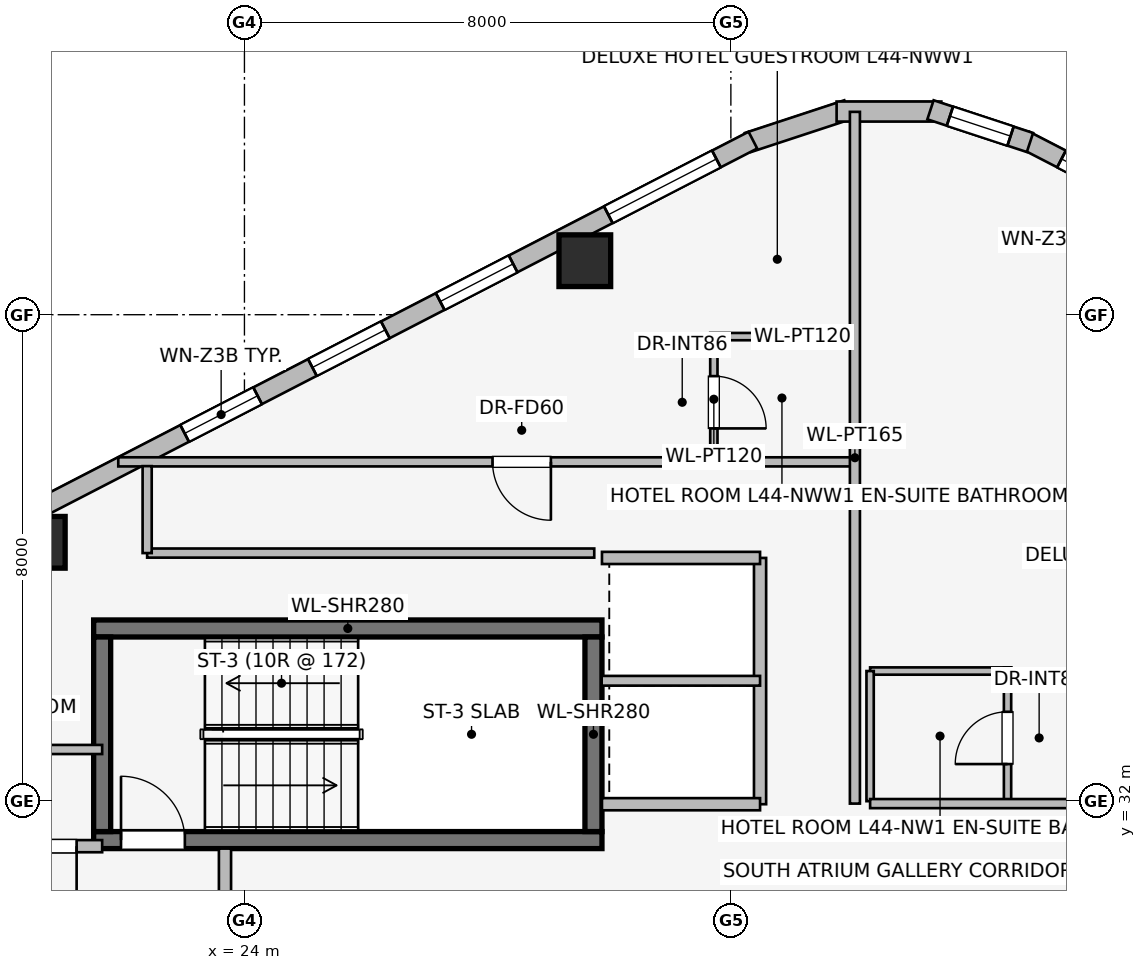
"""IFC4 building model, lengths in metres.
Left out: names, types, materials, properties, quantities, classifications, styles, units other than length and angle.
Written with IfcOpenShell. Run it as: python <this file> out.ifc"""

import sys

from ifc_helpers import new_model, si_unit, direction, frame, frame_2d, origin, origin_2d, place, context, subcontext, project, spatial, rectangle, extrude, element, fill, save


model = new_model("IFC4")
c1 = context("Model", 3, precision=1e-05, world=origin(), true_north=direction((0.0, 1.0)))
c2 = subcontext(c1, "Body", "Model", "MODEL_VIEW")
j1 = project(units=[si_unit("LENGTHUNIT", "METRE"), si_unit("PLANEANGLEUNIT", "RADIAN")], contexts=[c1])
p1 = place(None, origin())
s1 = spatial("IfcSite", under=j1, at=p1, CompositionType="ELEMENT")
p2 = place(p1, origin())
s2 = spatial("IfcBuilding", under=s1, at=p2, CompositionType="ELEMENT")
p3 = place(p2, frame((0.0, 0.0, 163.65)))
s3 = spatial("IfcBuildingStorey", under=s2, at=p3, CompositionType="ELEMENT", Elevation=163.65)
p4 = place(p3, frame((21.52, 31.36, 0.0), z_axis=(0.0, 0.0, 1.0), x_axis=(1.0, 0.0, 0.0)))
e1 = element("IfcWall", 1, at=p4, inside=s3, PredefinedType="SHEAR", context=c2, shape_type="SweptSolid", body=[
    extrude(rectangle(XDim=8.36, YDim=0.28, at=frame_2d((4.18, 0.0))), origin(), (0.0, 0.0, 1.0), 3.45),
])
p5 = place(p4, frame((0.45, 0.0, 0.0)))
e2 = element("IfcOpeningElement", 2, at=p5, cuts=e1, PredefinedType="OPENING", context=c2, shape_type="SweptSolid", body=[
    extrude(rectangle(XDim=1.05, YDim=2.0, at=frame_2d((0.525, 1.0))), frame((0.0, 0.15, 0.0), z_axis=(0.0, -1.0, 0.0), x_axis=(1.0, 0.0, 0.0)), (0.0, 0.0, 1.0), 0.3),
])
p6 = place(p3, frame((29.88, 34.84, 0.0), z_axis=(0.0, 0.0, 1.0), x_axis=(-1.0, 0.0, 0.0)))
e3 = element("IfcWall", 3, at=p6, inside=s3, PredefinedType="SHEAR", context=c2, shape_type="SweptSolid", body=[
    extrude(rectangle(XDim=8.36, YDim=0.28, at=frame_2d((4.18, 0.0))), origin(), (0.0, 0.0, 1.0), 3.45),
])
for number, where, z_axis, x_axis in (
    (4, (21.66, 34.7, 0.0), (0.0, 0.0, 1.0), (0.0, -1.0, 0.0)),
    (5, (29.74, 31.5, 0.0), (0.0, 0.0, 1.0), (0.0, 1.0, 0.0)),
):
    element("IfcWall", number, at=place(p3, frame(where, z_axis=z_axis, x_axis=x_axis)), inside=s3, PredefinedType="SHEAR", context=c2, shape_type="SweptSolid", body=[
        extrude(rectangle(XDim=3.2, YDim=0.28, at=frame_2d((1.6, 0.0))), origin(), (0.0, 0.0, 1.0), 3.45),
    ])
for number, where, z_axis, x_axis in (
    (6, (29.598, 40.888, 0.0), (0.0, 0.0, 1.0), (1.0, 0.0, 0.0)),
    (7, (20.626, 36.257, 0.0), (0.0, 0.0, 1.0), (1.0, 0.0, 0.0)),
):
    element("IfcColumn", number, at=place(p3, frame(where, z_axis=z_axis, x_axis=x_axis)), inside=s3, PredefinedType="COLUMN", context=c2, shape_type="SweptSolid", body=[
        extrude(rectangle(XDim=0.85, YDim=0.85, at=origin_2d()), origin(), (0.0, 0.0, 1.0), 3.45),
    ])
p7 = place(p3, frame((36.838, 42.871, 0.0), z_axis=(0.0, 0.0, 1.0), x_axis=(0.888645948291, -0.458593914686, 0.0)))
e8 = element("IfcWall", 8, at=p7, inside=s3, PredefinedType="STANDARD", context=c2, shape_type="SweptSolid", body=[
    extrude(rectangle(XDim=7.741, YDim=0.31, at=frame_2d((3.871, 0.0))), origin(), (0.0, 0.0, 1.0), 3.19),
])
p8 = place(p7, frame((4.196, 0.0, 0.0)))
e9 = element("IfcOpeningElement", 9, at=p8, cuts=e8, PredefinedType="OPENING", context=c2, shape_type="SweptSolid", body=[
    extrude(rectangle(XDim=1.1, YDim=2.04, at=frame_2d((0.55, 1.02))), frame((0.0, 0.165, 0.0), z_axis=(0.0, -1.0, 0.0), x_axis=(1.0, 0.0, 0.0)), (0.0, 0.0, 1.0), 0.33),
])
p9 = place(p7, frame((0.675, 0.0, 0.75)))
e10 = element("IfcOpeningElement", 10, at=p9, cuts=e8, PredefinedType="OPENING", context=c2, shape_type="SweptSolid", body=[
    extrude(rectangle(XDim=2.0, YDim=1.5, at=frame_2d((1.0, 0.75))), frame((0.0, 0.165, 0.0), z_axis=(0.0, -1.0, 0.0), x_axis=(1.0, 0.0, 0.0)), (0.0, 0.0, 1.0), 0.33),
])
p10 = place(p7, frame((5.879, 0.0, 0.75)))
e11 = element("IfcOpeningElement", 11, at=p10, cuts=e8, PredefinedType="OPENING", context=c2, shape_type="SweptSolid", body=[
    extrude(rectangle(XDim=1.05, YDim=1.4, at=frame_2d((0.525, 0.7))), frame((0.0, 0.165, 0.0), z_axis=(0.0, -1.0, 0.0), x_axis=(1.0, 0.0, 0.0)), (0.0, 0.0, 1.0), 0.33),
])
p11 = place(p3, frame((32.281, 42.832, 0.0), z_axis=(0.0, 0.0, 1.0), x_axis=(0.949937416267, 0.312440242569, 0.0)))
e12 = element("IfcWall", 12, at=p11, inside=s3, PredefinedType="STANDARD", context=c2, shape_type="SweptSolid", body=[
    extrude(rectangle(XDim=1.722, YDim=0.33, at=frame_2d((0.861, 0.0))), origin(), (0.0, 0.0, 1.0), 3.19),
])
p12 = place(p3, frame((33.739, 43.341, 0.0), z_axis=(0.0, 0.0, 1.0), x_axis=(1.0, 0.0, 0.0)))
e13 = element("IfcWall", 13, at=p12, inside=s3, PredefinedType="STANDARD", context=c2, shape_type="SweptSolid", body=[
    extrude(rectangle(XDim=1.722, YDim=0.33, at=frame_2d((0.861, 0.0))), origin(), (0.0, 0.0, 1.0), 3.19),
])
p13 = place(p3, frame((35.283, 43.37, 0.0), z_axis=(0.0, 0.0, 1.0), x_axis=(0.949937416267, -0.312440242569, 0.0)))
e14 = element("IfcWall", 14, at=p13, inside=s3, PredefinedType="STANDARD", context=c2, shape_type="SweptSolid", body=[
    extrude(rectangle(XDim=1.722, YDim=0.33, at=frame_2d((0.861, 0.0))), origin(), (0.0, 0.0, 1.0), 3.19),
])
p14 = place(p13, frame((0.336, 0.0, 0.75)))
e15 = element("IfcOpeningElement", 15, at=p14, cuts=e14, PredefinedType="OPENING", context=c2, shape_type="SweptSolid", body=[
    extrude(rectangle(XDim=1.05, YDim=1.4, at=frame_2d((0.525, 0.7))), frame((0.0, 0.175, 0.0), z_axis=(0.0, -1.0, 0.0), x_axis=(1.0, 0.0, 0.0)), (0.0, 0.0, 1.0), 0.35),
])
p15 = place(p3, frame((17.408, 35.153, 0.0), z_axis=(0.0, 0.0, 1.0), x_axis=(0.888626188278, 0.458632202867, 0.0)))
e16 = element("IfcWall", 16, at=p15, inside=s3, PredefinedType="STANDARD", context=c2, shape_type="SweptSolid", body=[
    extrude(rectangle(XDim=16.828, YDim=0.31, at=frame_2d((8.414, 0.0))), origin(), (0.0, 0.0, 1.0), 3.19),
])
p16 = place(p15, frame((0.675, 0.0, 0.75)))
e17 = element("IfcOpeningElement", 17, at=p16, cuts=e16, PredefinedType="OPENING", context=c2, shape_type="SweptSolid", body=[
    extrude(rectangle(XDim=2.0, YDim=1.5, at=frame_2d((1.0, 0.75))), frame((0.0, 0.165, 0.0), z_axis=(0.0, -1.0, 0.0), x_axis=(1.0, 0.0, 0.0)), (0.0, 0.0, 1.0), 0.33),
])
p17 = place(p15, frame((6.312, 0.0, 0.75)))
e18 = element("IfcOpeningElement", 18, at=p17, cuts=e16, PredefinedType="OPENING", context=c2, shape_type="SweptSolid", body=[
    extrude(rectangle(XDim=1.35, YDim=1.45, at=frame_2d((0.675, 0.725))), frame((0.0, 0.165, 0.0), z_axis=(0.0, -1.0, 0.0), x_axis=(1.0, 0.0, 0.0)), (0.0, 0.0, 1.0), 0.33),
])
p18 = place(p15, frame((8.676, 0.0, 0.75)))
e19 = element("IfcOpeningElement", 19, at=p18, cuts=e16, PredefinedType="OPENING", context=c2, shape_type="SweptSolid", body=[
    extrude(rectangle(XDim=1.35, YDim=1.45, at=frame_2d((0.675, 0.725))), frame((0.0, 0.165, 0.0), z_axis=(0.0, -1.0, 0.0), x_axis=(1.0, 0.0, 0.0)), (0.0, 0.0, 1.0), 0.33),
])
p19 = place(p15, frame((11.041, 0.0, 0.75)))
e20 = element("IfcOpeningElement", 20, at=p19, cuts=e16, PredefinedType="OPENING", context=c2, shape_type="SweptSolid", body=[
    extrude(rectangle(XDim=1.35, YDim=1.45, at=frame_2d((0.675, 0.725))), frame((0.0, 0.165, 0.0), z_axis=(0.0, -1.0, 0.0), x_axis=(1.0, 0.0, 0.0)), (0.0, 0.0, 1.0), 0.33),
])
p20 = place(p15, frame((14.153, 0.0, 0.75)))
e21 = element("IfcOpeningElement", 21, at=p20, cuts=e16, PredefinedType="OPENING", context=c2, shape_type="SweptSolid", body=[
    extrude(rectangle(XDim=2.0, YDim=1.5, at=frame_2d((1.0, 0.75))), frame((0.0, 0.165, 0.0), z_axis=(0.0, -1.0, 0.0), x_axis=(1.0, 0.0, 0.0)), (0.0, 0.0, 1.0), 0.33),
])
p21 = place(p3, frame((23.68, 25.68, 0.0), z_axis=(0.0, 0.0, 1.0), x_axis=(0.0, 1.0, 0.0)))
e22 = element("IfcWall", 22, at=p21, inside=s3, PredefinedType="PARTITIONING", context=c2, shape_type="SweptSolid", body=[
    extrude(rectangle(XDim=5.54, YDim=0.2, at=frame_2d((2.77, 0.0))), origin(), (0.0, 0.0, 1.0), 3.19),
])
p22 = place(p21, frame((1.8, 0.0, 0.0)))
e23 = element("IfcOpeningElement", 23, at=p22, cuts=e22, PredefinedType="OPENING", context=c2, shape_type="SweptSolid", body=[
    extrude(rectangle(XDim=1.05, YDim=2.0, at=frame_2d((0.525, 1.0))), frame((0.0, 0.11, 0.0), z_axis=(0.0, -1.0, 0.0), x_axis=(1.0, 0.0, 0.0)), (0.0, 0.0, 1.0), 0.22),
])
p23 = place(p3, frame((21.66, 31.26, 0.0), z_axis=(0.0, 0.0, 1.0), x_axis=(-1.0, 0.0, 0.0)))
e24 = element("IfcWall", 24, at=p23, inside=s3, PredefinedType="PARTITIONING", context=c2, shape_type="SweptSolid", body=[
    extrude(rectangle(XDim=2.01, YDim=0.2, at=frame_2d((1.005, 0.0))), origin(), (0.0, 0.0, 1.0), 3.19),
])
p24 = place(p23, frame((0.42, 0.0, 0.0)))
e25 = element("IfcOpeningElement", 25, at=p24, cuts=e24, PredefinedType="OPENING", context=c2, shape_type="SweptSolid", body=[
    extrude(rectangle(XDim=0.86, YDim=2.0, at=frame_2d((0.43, 1.0))), frame((0.0, 0.11, 0.0), z_axis=(0.0, -1.0, 0.0), x_axis=(1.0, 0.0, 0.0)), (0.0, 0.0, 1.0), 0.22),
])
p25 = place(p3, frame((32.48, 31.95, 0.0), z_axis=(0.0, 0.0, 1.0), x_axis=(0.0, 1.0, 0.0)))
e26 = element("IfcWall", 26, at=p25, inside=s3, PredefinedType="PARTITIONING", context=c2, shape_type="SweptSolid", body=[
    extrude(rectangle(XDim=4.05, YDim=0.2, at=frame_2d((2.025, 0.0))), origin(), (0.0, 0.0, 1.0), 3.19),
])
for number, where, z_axis, x_axis in (
    (27, (29.88, 36.0, 0.0), (0.0, 0.0, 1.0), (1.0, 0.0, 0.0)),
    (28, (32.48, 31.95, 0.0), (0.0, 0.0, 1.0), (-1.0, 0.0, 0.0)),
):
    element("IfcWall", number, at=place(p3, frame(where, z_axis=z_axis, x_axis=x_axis)), inside=s3, PredefinedType="PARTITIONING", context=c2, shape_type="SweptSolid", body=[
        extrude(rectangle(XDim=2.6, YDim=0.2, at=frame_2d((1.3, 0.0))), origin(), (0.0, 0.0, 1.0), 3.19),
    ])
p26 = place(p3, frame((29.875, 33.98, 0.0), z_axis=(0.0, 0.0, 1.0), x_axis=(1.0, 0.0, 0.0)))
e29 = element("IfcWall", 29, at=p26, inside=s3, PredefinedType="PARTITIONING", context=c2, shape_type="SweptSolid", body=[
    extrude(rectangle(XDim=2.605, YDim=0.16, at=frame_2d((1.302, 0.0))), origin(), (0.0, 0.0, 1.0), 3.19),
])
p27 = place(p3, frame((21.66, 32.85, 0.0), z_axis=(0.0, 0.0, 1.0), x_axis=(-1.0, 0.0, 0.0)))
e30 = element("IfcWall", 30, at=p27, inside=s3, PredefinedType="PARTITIONING", context=c2, shape_type="SweptSolid", body=[
    extrude(rectangle(XDim=1.71, YDim=0.15, at=frame_2d((0.855, 0.0))), origin(), (0.0, 0.0, 1.0), 3.19),
])
p28 = place(p3, frame((34.0, 39.64, 0.0), z_axis=(0.0, 0.0, 1.0), x_axis=(-1.0, 0.0, 0.0)))
e31 = element("IfcWall", 31, at=p28, inside=s3, PredefinedType="PARTITIONING", context=c2, shape_type="SweptSolid", body=[
    extrude(rectangle(XDim=2.34, YDim=0.12, at=frame_2d((1.17, 0.0))), origin(), (0.0, 0.0, 1.0), 3.19),
])
p29 = place(p3, frame((31.72, 39.64, 0.0), z_axis=(0.0, 0.0, 1.0), x_axis=(0.0, -1.0, 0.0)))
e32 = element("IfcWall", 32, at=p29, inside=s3, PredefinedType="PARTITIONING", context=c2, shape_type="SweptSolid", body=[
    extrude(rectangle(XDim=2.06, YDim=0.12, at=frame_2d((1.03, 0.0))), origin(), (0.0, 0.0, 1.0), 3.19),
])
p30 = place(p29, frame((0.65, 0.0, 0.0)))
e33 = element("IfcOpeningElement", 33, at=p30, cuts=e32, PredefinedType="OPENING", context=c2, shape_type="SweptSolid", body=[
    extrude(rectangle(XDim=0.86, YDim=2.0, at=frame_2d((0.43, 1.0))), frame((0.0, 0.07, 0.0), z_axis=(0.0, -1.0, 0.0), x_axis=(1.0, 0.0, 0.0)), (0.0, 0.0, 1.0), 0.14),
])
p31 = place(p3, frame((34.0, 37.58, 0.0), z_axis=(0.0, 0.0, 1.0), x_axis=(-1.0, 0.0, 0.0)))
e34 = element("IfcWall", 34, at=p31, inside=s3, PredefinedType="PARTITIONING", context=c2, shape_type="SweptSolid", body=[
    extrude(rectangle(XDim=12.075, YDim=0.15, at=frame_2d((6.038, 0.0))), origin(), (0.0, 0.0, 1.0), 3.19),
])
p32 = place(p31, frame((4.96, 0.0, 0.0)))
e35 = element("IfcOpeningElement", 35, at=p32, cuts=e34, PredefinedType="OPENING", context=c2, shape_type="SweptSolid", body=[
    extrude(rectangle(XDim=0.96, YDim=2.0, at=frame_2d((0.48, 1.0))), frame((0.0, 0.085, 0.0), z_axis=(0.0, -1.0, 0.0), x_axis=(1.0, 0.0, 0.0)), (0.0, 0.0, 1.0), 0.17),
])
p33 = place(p3, frame((34.04, 31.96, 0.0), z_axis=(0.0, 0.0, 1.0), x_axis=(0.0, 1.0, 0.0)))
e36 = element("IfcWall", 36, at=p33, inside=s3, PredefinedType="PARTITIONING", context=c2, shape_type="SweptSolid", body=[
    extrude(rectangle(XDim=11.376, YDim=0.165, at=frame_2d((5.688, 0.0))), origin(), (0.0, 0.0, 1.0), 3.19),
])
p34 = place(p3, frame((36.55, 31.96, 0.0), z_axis=(0.0, 0.0, 1.0), x_axis=(0.0, 1.0, 0.0)))
e37 = element("IfcWall", 37, at=p34, inside=s3, PredefinedType="PARTITIONING", context=c2, shape_type="SweptSolid", body=[
    extrude(rectangle(XDim=2.24, YDim=0.12, at=frame_2d((1.12, 0.0))), origin(), (0.0, 0.0, 1.0), 3.19),
])
p35 = place(p34, frame((0.65, 0.0, 0.0)))
e38 = element("IfcOpeningElement", 38, at=p35, cuts=e37, PredefinedType="OPENING", context=c2, shape_type="SweptSolid", body=[
    extrude(rectangle(XDim=0.86, YDim=2.0, at=frame_2d((0.43, 1.0))), frame((0.0, 0.07, 0.0), z_axis=(0.0, -1.0, 0.0), x_axis=(1.0, 0.0, 0.0)), (0.0, 0.0, 1.0), 0.14),
])
p36 = place(p3, frame((36.61, 34.14, 0.0), z_axis=(0.0, 0.0, 1.0), x_axis=(-1.0, 0.0, 0.0)))
e39 = element("IfcWall", 39, at=p36, inside=s3, PredefinedType="PARTITIONING", context=c2, shape_type="SweptSolid", body=[
    extrude(rectangle(XDim=2.32, YDim=0.12, at=frame_2d((1.16, 0.0))), origin(), (0.0, 0.0, 1.0), 3.19),
])
p37 = place(p3, frame((34.29, 34.14, 0.0), z_axis=(0.0, 0.0, 1.0), x_axis=(0.0, -1.0, 0.0)))
e40 = element("IfcWall", 40, at=p37, inside=s3, PredefinedType="PARTITIONING", context=c2, shape_type="SweptSolid", body=[
    extrude(rectangle(XDim=2.14, YDim=0.12, at=frame_2d((1.07, 0.0))), origin(), (0.0, 0.0, 1.0), 3.19),
])
p38 = place(p3, frame((43.985, 31.96, 0.0), z_axis=(0.0, 0.0, 1.0), x_axis=(-1.0, 0.0, 0.0)))
e41 = element("IfcWall", 41, at=p38, inside=s3, PredefinedType="PARTITIONING", context=c2, shape_type="SweptSolid", body=[
    extrude(rectangle(XDim=9.695, YDim=0.15, at=frame_2d((4.848, 0.0))), origin(), (0.0, 0.0, 1.0), 3.19),
])
p39 = place(p38, frame((3.148, 0.0, 0.0)))
e42 = element("IfcOpeningElement", 42, at=p39, cuts=e41, PredefinedType="OPENING", context=c2, shape_type="SweptSolid", body=[
    extrude(rectangle(XDim=0.96, YDim=2.0, at=frame_2d((0.48, 1.0))), frame((0.0, 0.085, 0.0), z_axis=(0.0, -1.0, 0.0), x_axis=(1.0, 0.0, 0.0)), (0.0, 0.0, 1.0), 0.17),
])
p40 = place(p3, frame((29.753, 36.08, 0.0), z_axis=(0.0, 0.0, 1.0), x_axis=(-1.0, 0.0, 0.0)))
e43 = element("IfcWall", 43, at=p40, inside=s3, PredefinedType="PARTITIONING", context=c2, shape_type="SweptSolid", body=[
    extrude(rectangle(XDim=7.353, YDim=0.15, at=frame_2d((3.677, 0.0))), origin(), (0.0, 0.0, 1.0), 3.19),
])
p41 = place(p3, frame((22.4, 36.08, 0.0), z_axis=(0.0, 0.0, 1.0), x_axis=(0.0, 1.0, 0.0)))
e44 = element("IfcWall", 44, at=p41, inside=s3, PredefinedType="PARTITIONING", context=c2, shape_type="SweptSolid", body=[
    extrude(rectangle(XDim=1.43, YDim=0.15, at=frame_2d((0.715, 0.0))), origin(), (0.0, 0.0, 1.0), 3.19),
])
p42 = place(p9, origin())
e45 = element("IfcWindow", 45, at=p42, inside=s3, PartitioningType="SINGLE_PANEL", PredefinedType="WINDOW", context=c2, shape_type="SweptSolid", body=[
    extrude(rectangle(XDim=2.0, YDim=1.5, at=frame_2d((1.0, 0.75))), frame((0.0, 0.03, 0.0), z_axis=(0.0, -1.0, 0.0), x_axis=(1.0, 0.0, 0.0)), (0.0, 0.0, 1.0), 0.06),
])
fill(e10, e45)
p43 = place(p14, origin())
e46 = element("IfcWindow", 46, at=p43, inside=s3, PartitioningType="SINGLE_PANEL", PredefinedType="WINDOW", context=c2, shape_type="SweptSolid", body=[
    extrude(rectangle(XDim=1.05, YDim=1.4, at=frame_2d((0.525, 0.7))), frame((0.0, 0.03, 0.0), z_axis=(0.0, -1.0, 0.0), x_axis=(1.0, 0.0, 0.0)), (0.0, 0.0, 1.0), 0.06),
])
fill(e15, e46)
p44 = place(p17, origin())
e47 = element("IfcWindow", 47, at=p44, inside=s3, PartitioningType="SINGLE_PANEL", PredefinedType="WINDOW", context=c2, shape_type="SweptSolid", body=[
    extrude(rectangle(XDim=1.35, YDim=1.45, at=frame_2d((0.675, 0.725))), frame((0.0, 0.03, 0.0), z_axis=(0.0, -1.0, 0.0), x_axis=(1.0, 0.0, 0.0)), (0.0, 0.0, 1.0), 0.06),
])
fill(e18, e47)
p45 = place(p18, origin())
e48 = element("IfcWindow", 48, at=p45, inside=s3, PartitioningType="SINGLE_PANEL", PredefinedType="WINDOW", context=c2, shape_type="SweptSolid", body=[
    extrude(rectangle(XDim=1.35, YDim=1.45, at=frame_2d((0.675, 0.725))), frame((0.0, 0.03, 0.0), z_axis=(0.0, -1.0, 0.0), x_axis=(1.0, 0.0, 0.0)), (0.0, 0.0, 1.0), 0.06),
])
fill(e19, e48)
p46 = place(p19, origin())
e49 = element("IfcWindow", 49, at=p46, inside=s3, PartitioningType="SINGLE_PANEL", PredefinedType="WINDOW", context=c2, shape_type="SweptSolid", body=[
    extrude(rectangle(XDim=1.35, YDim=1.45, at=frame_2d((0.675, 0.725))), frame((0.0, 0.03, 0.0), z_axis=(0.0, -1.0, 0.0), x_axis=(1.0, 0.0, 0.0)), (0.0, 0.0, 1.0), 0.06),
])
fill(e20, e49)
p47 = place(p20, origin())
e50 = element("IfcWindow", 50, at=p47, inside=s3, PartitioningType="SINGLE_PANEL", PredefinedType="WINDOW", context=c2, shape_type="SweptSolid", body=[
    extrude(rectangle(XDim=2.0, YDim=1.5, at=frame_2d((1.0, 0.75))), frame((0.0, 0.03, 0.0), z_axis=(0.0, -1.0, 0.0), x_axis=(1.0, 0.0, 0.0)), (0.0, 0.0, 1.0), 0.06),
])
fill(e21, e50)
p48 = place(p5, origin())
e51 = element("IfcDoor", 51, at=p48, inside=s3, OperationType="SINGLE_SWING_LEFT", PredefinedType="DOOR", context=c2, shape_type="SweptSolid", body=[
    extrude(rectangle(XDim=1.05, YDim=2.0, at=frame_2d((0.525, 1.0))), frame((0.0, 0.025, 0.0), z_axis=(0.0, -1.0, 0.0), x_axis=(1.0, 0.0, 0.0)), (0.0, 0.0, 1.0), 0.05),
])
fill(e2, e51)
p49 = place(p24, origin())
e52 = element("IfcDoor", 52, at=p49, inside=s3, OperationType="SINGLE_SWING_LEFT", PredefinedType="DOOR", context=c2, shape_type="SweptSolid", body=[
    extrude(rectangle(XDim=0.86, YDim=2.0, at=frame_2d((0.43, 1.0))), frame((0.0, 0.025, 0.0), z_axis=(0.0, -1.0, 0.0), x_axis=(1.0, 0.0, 0.0)), (0.0, 0.0, 1.0), 0.05),
])
fill(e25, e52)
p50 = place(p30, origin())
e53 = element("IfcDoor", 53, at=p50, inside=s3, OperationType="SINGLE_SWING_RIGHT", PredefinedType="DOOR", context=c2, shape_type="SweptSolid", body=[
    extrude(rectangle(XDim=0.86, YDim=2.0, at=frame_2d((0.43, 1.0))), frame((0.0, 0.025, 0.0), z_axis=(0.0, -1.0, 0.0), x_axis=(1.0, 0.0, 0.0)), (0.0, 0.0, 1.0), 0.05),
])
fill(e33, e53)
p51 = place(p32, origin())
e54 = element("IfcDoor", 54, at=p51, inside=s3, OperationType="SINGLE_SWING_LEFT", PredefinedType="DOOR", context=c2, shape_type="SweptSolid", body=[
    extrude(rectangle(XDim=0.96, YDim=2.0, at=frame_2d((0.48, 1.0))), frame((0.0, 0.025, 0.0), z_axis=(0.0, -1.0, 0.0), x_axis=(1.0, 0.0, 0.0)), (0.0, 0.0, 1.0), 0.05),
])
fill(e35, e54)
p52 = place(p35, origin())
e55 = element("IfcDoor", 55, at=p52, inside=s3, OperationType="SINGLE_SWING_LEFT", PredefinedType="DOOR", context=c2, shape_type="SweptSolid", body=[
    extrude(rectangle(XDim=0.86, YDim=2.0, at=frame_2d((0.43, 1.0))), frame((0.0, 0.025, 0.0), z_axis=(0.0, -1.0, 0.0), x_axis=(1.0, 0.0, 0.0)), (0.0, 0.0, 1.0), 0.05),
])
fill(e38, e55)
save(model, sys.argv[1])
